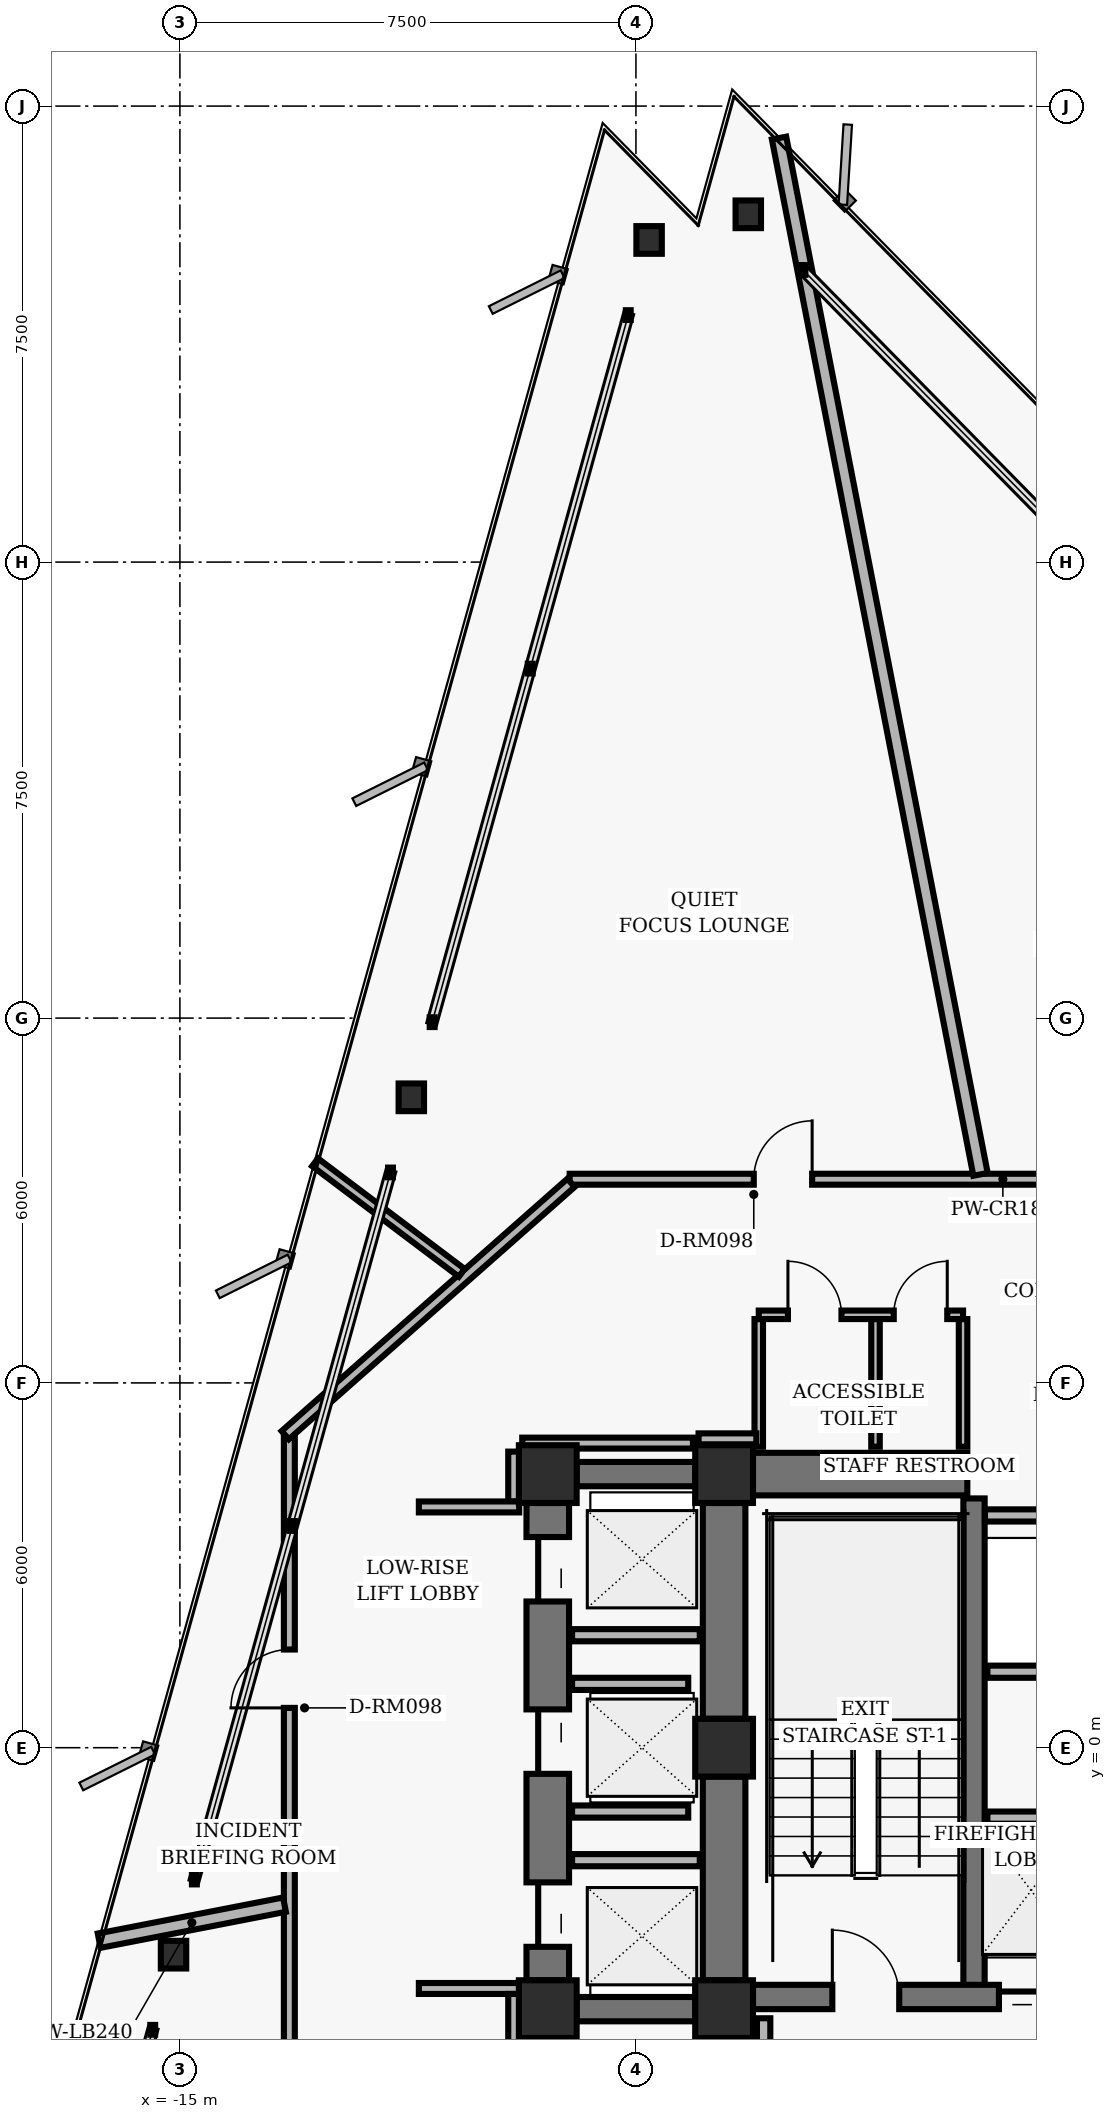
"""IFC4 building model, lengths in metres.
Left out: names, types, materials, properties, quantities, classifications, styles, units other than length and angle.
Written with IfcOpenShell. Run it as: python <this file> out.ifc"""

import sys

from ifc_helpers import new_model, si_unit, direction, frame, frame_2d, origin, origin_2d, place, context, subcontext, project, spatial, rectangle, hollow_rectangle, i_section, extrude, element, fill, save


model = new_model("IFC4")
c1 = context("Model", 3, precision=1e-05, world=origin(), true_north=direction((0.0, 1.0)))
c2 = subcontext(c1, "Body", "Model", "MODEL_VIEW")
j1 = project(units=[si_unit("LENGTHUNIT", "METRE"), si_unit("PLANEANGLEUNIT", "RADIAN")], contexts=[c1])
p1 = place(None, origin())
s1 = spatial("IfcSite", under=j1, at=p1, CompositionType="ELEMENT")
p2 = place(p1, origin())
s2 = spatial("IfcBuilding", under=s1, at=p2, CompositionType="ELEMENT")
p3 = place(p2, frame((0.0, 0.0, 79.52)))
s3 = spatial("IfcBuildingStorey", under=s2, at=p3, CompositionType="ELEMENT", Elevation=79.52)
for number, where, z_axis, x_axis in (
    (1, (-6.05, 4.5, 0.0), (0.0, 0.0, 1.0), (1.0, 0.0, 0.0)),
    (2, (-6.05, 0.0, 0.0), (0.0, 0.0, 1.0), (1.0, 0.0, 0.0)),
    (3, (-6.05, -4.3, 0.0), (0.0, 0.0, 1.0), (1.0, 0.0, 0.0)),
    (4, (-8.95, 4.5, 0.0), (0.0, 0.0, 1.0), (1.0, 0.0, 0.0)),
    (5, (-8.95, -4.3, 0.0), (0.0, 0.0, 1.0), (1.0, 0.0, 0.0)),
):
    element("IfcColumn", number, at=place(p3, frame(where, z_axis=z_axis, x_axis=x_axis)), inside=s3, PredefinedType="COLUMN", context=c2, shape_type="SweptSolid", body=[
        extrude(hollow_rectangle(XDim=0.95, YDim=0.95, WallThickness=0.06, InnerFilletRadius=0.02, OuterFilletRadius=0.04, at=origin_2d()), origin(), (0.0, 0.0, 1.0), 3.04),
    ])
p4 = place(p3, frame((-6.05, 0.475, 0.0), z_axis=(0.0, 0.0, 1.0), x_axis=(0.0, 1.0, 0.0)))
e6 = element("IfcWall", 6, at=p4, inside=s3, PredefinedType="SHEAR", context=c2, shape_type="SweptSolid", body=[
    extrude(rectangle(XDim=3.55, YDim=0.7, at=frame_2d((1.775, 0.0))), origin(), (0.0, 0.0, 1.0), 2.788),
])
p5 = place(p3, frame((-6.05, -3.825, 0.0), z_axis=(0.0, 0.0, 1.0), x_axis=(0.0, 1.0, 0.0)))
e7 = element("IfcWall", 7, at=p5, inside=s3, PredefinedType="SHEAR", context=c2, shape_type="SweptSolid", body=[
    extrude(rectangle(XDim=3.35, YDim=0.7, at=frame_2d((1.675, 0.0))), origin(), (0.0, 0.0, 1.0), 2.788),
])
p6 = place(p3, frame((-1.94, -4.1, 0.0), z_axis=(0.0, 0.0, 1.0), x_axis=(0.0, 1.0, 0.0)))
e8 = element("IfcWall", 8, at=p6, inside=s3, PredefinedType="SHEAR", context=c2, shape_type="SweptSolid", body=[
    extrude(rectangle(XDim=8.2, YDim=0.35, at=frame_2d((4.1, 0.0))), origin(), (0.0, 0.0, 1.0), 2.788),
])
p7 = place(p3, frame((-5.575, -4.1, 0.0), z_axis=(0.0, 0.0, 1.0), x_axis=(1.0, 0.0, 0.0)))
e9 = element("IfcWall", 9, at=p7, inside=s3, PredefinedType="SHEAR", context=c2, shape_type="SweptSolid", body=[
    extrude(rectangle(XDim=11.15, YDim=0.4, at=frame_2d((5.575, 0.0))), origin(), (0.0, 0.0, 1.0), 2.788),
])
p8 = place(p7, frame((1.305, 0.0, 0.0)))
e10 = element("IfcOpeningElement", 10, at=p8, cuts=e9, PredefinedType="OPENING", context=c2, shape_type="SweptSolid", body=[
    extrude(rectangle(XDim=1.1, YDim=2.04, at=frame_2d((0.55, 1.02))), frame((0.0, 0.21, 0.0), z_axis=(0.0, -1.0, 0.0), x_axis=(1.0, 0.0, 0.0)), (0.0, 0.0, 1.0), 0.42),
])
p9 = place(p7, frame((8.745, 0.0, 0.0)))
e11 = element("IfcOpeningElement", 11, at=p9, cuts=e9, PredefinedType="OPENING", context=c2, shape_type="SweptSolid", body=[
    extrude(rectangle(XDim=1.1, YDim=2.04, at=frame_2d((0.55, 1.02))), frame((0.0, 0.21, 0.0), z_axis=(0.0, -1.0, 0.0), x_axis=(1.0, 0.0, 0.0)), (0.0, 0.0, 1.0), 0.42),
])
p10 = place(p7, frame((4.045, 0.0, 0.0)))
e12 = element("IfcOpeningElement", 12, at=p10, cuts=e9, PredefinedType="OPENING", context=c2, shape_type="SweptSolid", body=[
    extrude(rectangle(XDim=1.06, YDim=2.04, at=frame_2d((0.53, 1.02))), frame((0.0, 0.21, 0.0), z_axis=(0.0, -1.0, 0.0), x_axis=(1.0, 0.0, 0.0)), (0.0, 0.0, 1.0), 0.42),
])
p11 = place(p7, frame((6.045, 0.0, 0.0)))
e13 = element("IfcOpeningElement", 13, at=p11, cuts=e9, PredefinedType="OPENING", context=c2, shape_type="SweptSolid", body=[
    extrude(rectangle(XDim=1.06, YDim=2.04, at=frame_2d((0.53, 1.02))), frame((0.0, 0.21, 0.0), z_axis=(0.0, -1.0, 0.0), x_axis=(1.0, 0.0, 0.0)), (0.0, 0.0, 1.0), 0.42),
])
p12 = place(p3, frame((-5.575, 4.5, 0.0), z_axis=(0.0, 0.0, 1.0), x_axis=(1.0, 0.0, 0.0)))
e14 = element("IfcWall", 14, at=p12, inside=s3, PredefinedType="SHEAR", context=c2, shape_type="SweptSolid", body=[
    extrude(rectangle(XDim=3.525, YDim=0.7, at=frame_2d((1.762, 0.0))), origin(), (0.0, 0.0, 1.0), 2.788),
])
p13 = place(p3, frame((-8.95, -3.825, 0.0), z_axis=(0.0, 0.0, 1.0), x_axis=(0.0, 1.0, 0.0)))
e15 = element("IfcWall", 15, at=p13, inside=s3, PredefinedType="SHEAR", context=c2, shape_type="SweptSolid", body=[
    extrude(rectangle(XDim=7.85, YDim=0.7, at=frame_2d((3.925, 0.0))), origin(), (0.0, 0.0, 1.0), 2.788),
])
p14 = place(p13, frame((0.55, 0.0, 0.0)))
e16 = element("IfcOpeningElement", 16, at=p14, cuts=e15, PredefinedType="OPENING", context=c2, shape_type="SweptSolid", body=[
    extrude(rectangle(XDim=1.06, YDim=2.04, at=frame_2d((0.53, 1.02))), frame((0.0, 0.36, 0.0), z_axis=(0.0, -1.0, 0.0), x_axis=(1.0, 0.0, 0.0)), (0.0, 0.0, 1.0), 0.72),
])
p15 = place(p13, frame((3.395, 0.0, 0.0)))
e17 = element("IfcOpeningElement", 17, at=p15, cuts=e15, PredefinedType="OPENING", context=c2, shape_type="SweptSolid", body=[
    extrude(rectangle(XDim=1.06, YDim=2.04, at=frame_2d((0.53, 1.02))), frame((0.0, 0.36, 0.0), z_axis=(0.0, -1.0, 0.0), x_axis=(1.0, 0.0, 0.0)), (0.0, 0.0, 1.0), 0.72),
])
p16 = place(p13, frame((6.23, 0.0, 0.0)))
e18 = element("IfcOpeningElement", 18, at=p16, cuts=e15, PredefinedType="OPENING", context=c2, shape_type="SweptSolid", body=[
    extrude(rectangle(XDim=1.06, YDim=2.04, at=frame_2d((0.53, 1.02))), frame((0.0, 0.36, 0.0), z_axis=(0.0, -1.0, 0.0), x_axis=(1.0, 0.0, 0.0)), (0.0, 0.0, 1.0), 0.72),
])
for number, where, z_axis, x_axis in (
    (19, (-8.475, 4.5, 0.0), (0.0, 0.0, 1.0), (1.0, 0.0, 0.0)),
    (20, (-8.475, -4.3, 0.0), (0.0, 0.0, 1.0), (1.0, 0.0, 0.0)),
):
    element("IfcWall", number, at=place(p3, frame(where, z_axis=z_axis, x_axis=x_axis)), inside=s3, PredefinedType="SHEAR", context=c2, shape_type="SweptSolid", body=[
        extrude(rectangle(XDim=1.95, YDim=0.4, at=frame_2d((0.975, 0.0))), origin(), (0.0, 0.0, 1.0), 2.788),
    ])
for number, where, z_axis, x_axis in (
    (21, (-5.652, 25.22, 0.0), (0.0, 0.0, 1.0), (1.0, 0.0, 0.0)),
    (22, (-7.283, 24.798, 0.0), (0.0, 0.0, 1.0), (1.0, 0.0, 0.0)),
    (23, (-11.194, 10.697, 0.0), (0.0, 0.0, 1.0), (1.0, 0.0, 0.0)),
    (24, (-15.104, -3.404, 0.0), (0.0, 0.0, 1.0), (1.0, 0.0, 0.0)),
):
    element("IfcColumn", number, at=place(p3, frame(where, z_axis=z_axis, x_axis=x_axis)), inside=s3, PredefinedType="COLUMN", context=c2, shape_type="SweptSolid", body=[
        extrude(i_section(OverallWidth=0.418, OverallDepth=0.455, WebThickness=0.042, FlangeThickness=0.068, FilletRadius=0.025, at=origin_2d()), origin(), (0.0, 0.0, 1.0), 3.04),
    ])
p17 = place(p3, frame((-1.72, -1.15, 0.0), z_axis=(0.0, 0.0, 1.0), x_axis=(1.0, 0.0, 0.0)))
e25 = element("IfcWall", 25, at=p17, inside=s3, PredefinedType="PARTITIONING", context=c2, shape_type="SweptSolid", body=[
    extrude(rectangle(XDim=3.44, YDim=0.2, at=frame_2d((1.72, 0.0))), origin(), (0.0, 0.0, 1.0), 2.763),
])
p18 = place(p3, frame((-5.4, -7.16, 0.0), z_axis=(0.0, 0.0, 1.0), x_axis=(0.0, 1.0, 0.0)))
e26 = element("IfcWall", 26, at=p18, inside=s3, PredefinedType="PARTITIONING", context=c2, shape_type="SweptSolid", body=[
    extrude(rectangle(XDim=2.71, YDim=0.22, at=frame_2d((1.355, 0.0))), origin(), (0.0, 0.0, 1.0), 2.763),
])
p19 = place(p3, frame((-1.72, 1.25, 0.0), z_axis=(0.0, 0.0, 1.0), x_axis=(1.0, 0.0, 0.0)))
e27 = element("IfcWall", 27, at=p19, inside=s3, PredefinedType="PARTITIONING", context=c2, shape_type="SweptSolid", body=[
    extrude(rectangle(XDim=3.44, YDim=0.2, at=frame_2d((1.72, 0.0))), origin(), (0.0, 0.0, 1.0), 2.763),
])
p20 = place(p3, frame((-1.76, 3.82, 0.0), z_axis=(0.0, 0.0, 1.0), x_axis=(1.0, 0.0, 0.0)))
e28 = element("IfcWall", 28, at=p20, inside=s3, PredefinedType="PARTITIONING", context=c2, shape_type="SweptSolid", body=[
    extrude(rectangle(XDim=3.52, YDim=0.2, at=frame_2d((1.76, 0.0))), origin(), (0.0, 0.0, 1.0), 2.763),
])
for number, where, z_axis, x_axis in (
    (29, (-5.48, 4.95, 0.0), (0.0, 0.0, 1.0), (0.0, 1.0, 0.0)),
    (30, (-3.56, 4.95, 0.0), (0.0, 0.0, 1.0), (0.0, 1.0, 0.0)),
    (31, (-2.12, 4.95, 0.0), (0.0, 0.0, 1.0), (0.0, 1.0, 0.0)),
):
    element("IfcWall", number, at=place(p3, frame(where, z_axis=z_axis, x_axis=x_axis)), inside=s3, PredefinedType="PARTITIONING", context=c2, shape_type="SweptSolid", body=[
        extrude(rectangle(XDim=2.1, YDim=0.14, at=frame_2d((1.05, 0.0))), origin(), (0.0, 0.0, 1.0), 2.763),
    ])
p21 = place(p3, frame((-5.48, 7.12, 0.0), z_axis=(0.0, 0.0, 1.0), x_axis=(1.0, 0.0, 0.0)))
e32 = element("IfcWall", 32, at=p21, inside=s3, PredefinedType="PARTITIONING", context=c2, shape_type="SweptSolid", body=[
    extrude(rectangle(XDim=3.36, YDim=0.14, at=frame_2d((1.68, 0.0))), origin(), (0.0, 0.0, 1.0), 2.763),
])
p22 = place(p21, frame((0.48, 0.0, 0.0)))
e33 = element("IfcOpeningElement", 33, at=p22, cuts=e32, PredefinedType="OPENING", context=c2, shape_type="SweptSolid", body=[
    extrude(rectangle(XDim=0.88, YDim=2.02, at=frame_2d((0.44, 1.01))), frame((0.0, 0.08, 0.0), z_axis=(0.0, -1.0, 0.0), x_axis=(1.0, 0.0, 0.0)), (0.0, 0.0, 1.0), 0.16),
])
p23 = place(p21, frame((2.22, 0.0, 0.0)))
e34 = element("IfcOpeningElement", 34, at=p23, cuts=e32, PredefinedType="OPENING", context=c2, shape_type="SweptSolid", body=[
    extrude(rectangle(XDim=0.88, YDim=2.02, at=frame_2d((0.44, 1.01))), frame((0.0, 0.08, 0.0), z_axis=(0.0, -1.0, 0.0), x_axis=(1.0, 0.0, 0.0)), (0.0, 0.0, 1.0), 0.16),
])
for number, where, z_axis, x_axis in (
    (35, (-8.55, -1.85, 0.0), (0.0, 0.0, 1.0), (1.0, 0.0, 0.0)),
    (36, (-8.55, 1.85, 0.0), (0.0, 0.0, 1.0), (1.0, 0.0, 0.0)),
):
    element("IfcWall", number, at=place(p3, frame(where, z_axis=z_axis, x_axis=x_axis)), inside=s3, PredefinedType="PARTITIONING", context=c2, shape_type="SweptSolid", body=[
        extrude(rectangle(XDim=2.1, YDim=0.2, at=frame_2d((1.05, 0.0))), origin(), (0.0, 0.0, 1.0), 2.763),
    ])
for number, where, z_axis, x_axis in (
    (37, (-8.55, -1.05, 0.0), (0.0, 0.0, 1.0), (1.0, 0.0, 0.0)),
    (38, (-8.55, 1.05, 0.0), (0.0, 0.0, 1.0), (1.0, 0.0, 0.0)),
):
    element("IfcWall", number, at=place(p3, frame(where, z_axis=z_axis, x_axis=x_axis)), inside=s3, PredefinedType="PARTITIONING", context=c2, shape_type="SweptSolid", body=[
        extrude(rectangle(XDim=1.91, YDim=0.2, at=frame_2d((0.955, 0.0))), origin(), (0.0, 0.0, 1.0), 2.763),
    ])
p24 = place(p3, frame((-8.59, 9.35, 0.0), z_axis=(0.0, 0.0, 1.0), x_axis=(1.0, 0.0, 0.0)))
e39 = element("IfcWall", 39, at=p24, inside=s3, PredefinedType="PARTITIONING", context=c2, shape_type="SweptSolid", body=[
    extrude(rectangle(XDim=17.18, YDim=0.18, at=frame_2d((8.59, 0.0))), origin(), (0.0, 0.0, 1.0), 2.277),
])
p25 = place(p24, frame((10.261, 0.0, 0.0)))
e40 = element("IfcOpeningElement", 40, at=p25, cuts=e39, PredefinedType="OPENING", context=c2, shape_type="SweptSolid", body=[
    extrude(rectangle(XDim=0.96, YDim=2.02, at=frame_2d((0.48, 1.01))), frame((0.0, 0.1, 0.0), z_axis=(0.0, -1.0, 0.0), x_axis=(1.0, 0.0, 0.0)), (0.0, 0.0, 1.0), 0.2),
])
p26 = place(p24, frame((3.028, 0.0, 0.0)))
e41 = element("IfcOpeningElement", 41, at=p26, cuts=e39, PredefinedType="OPENING", context=c2, shape_type="SweptSolid", body=[
    extrude(rectangle(XDim=0.96, YDim=2.02, at=frame_2d((0.48, 1.01))), frame((0.0, 0.1, 0.0), z_axis=(0.0, -1.0, 0.0), x_axis=(1.0, 0.0, 0.0)), (0.0, 0.0, 1.0), 0.2),
])
p27 = place(p3, frame((-13.2, -5.11, 0.0), z_axis=(0.0, 0.0, 1.0), x_axis=(0.0, 1.0, 0.0)))
e42 = element("IfcWall", 42, at=p27, inside=s3, PredefinedType="PARTITIONING", context=c2, shape_type="SweptSolid", body=[
    extrude(rectangle(XDim=10.22, YDim=0.18, at=frame_2d((5.11, 0.0))), origin(), (0.0, 0.0, 1.0), 2.143),
])
p28 = place(p27, frame((5.765, 0.0, 0.0)))
e43 = element("IfcOpeningElement", 43, at=p28, cuts=e42, PredefinedType="OPENING", context=c2, shape_type="SweptSolid", body=[
    extrude(rectangle(XDim=0.96, YDim=2.02, at=frame_2d((0.48, 1.01))), frame((0.0, 0.1, 0.0), z_axis=(0.0, -1.0, 0.0), x_axis=(1.0, 0.0, 0.0)), (0.0, 0.0, 1.0), 0.2),
])
p29 = place(p3, frame((-13.268, 5.14, 0.0), z_axis=(0.0, 0.0, 1.0), x_axis=(0.749626463267, 0.66186113768, 0.0)))
e44 = element("IfcWall", 44, at=p29, inside=s3, PredefinedType="PARTITIONING", context=c2, shape_type="SweptSolid", body=[
    extrude(rectangle(XDim=6.27, YDim=0.18, at=frame_2d((3.135, 0.0))), origin(), (0.0, 0.0, 1.0), 2.763),
])
p30 = place(p3, frame((-9.51, 4.87, 0.0), z_axis=(0.0, 0.0, 1.0), x_axis=(0.0, -1.0, 0.0)))
e45 = element("IfcWall", 45, at=p30, inside=s3, PredefinedType="PARTITIONING", context=c2, shape_type="SweptSolid", body=[
    extrude(rectangle(XDim=0.82, YDim=0.18, at=frame_2d((0.41, 0.0))), origin(), (0.0, 0.0, 1.0), 2.277),
])
p31 = place(p3, frame((-9.42, 3.96, 0.0), z_axis=(0.0, 0.0, 1.0), x_axis=(-1.0, 0.0, 0.0)))
e46 = element("IfcWall", 46, at=p31, inside=s3, PredefinedType="PARTITIONING", context=c2, shape_type="SweptSolid", body=[
    extrude(rectangle(XDim=1.65, YDim=0.18, at=frame_2d((0.825, 0.0))), origin(), (0.0, 0.0, 1.0), 2.763),
])
p32 = place(p3, frame((-11.07, -3.96, 0.0), z_axis=(0.0, 0.0, 1.0), x_axis=(1.0, 0.0, 0.0)))
e47 = element("IfcWall", 47, at=p32, inside=s3, PredefinedType="PARTITIONING", context=c2, shape_type="SweptSolid", body=[
    extrude(rectangle(XDim=1.65, YDim=0.18, at=frame_2d((0.825, 0.0))), origin(), (0.0, 0.0, 1.0), 2.048),
])
p33 = place(p3, frame((-9.51, -4.05, 0.0), z_axis=(0.0, 0.0, 1.0), x_axis=(0.0, -1.0, 0.0)))
e48 = element("IfcWall", 48, at=p33, inside=s3, PredefinedType="PARTITIONING", context=c2, shape_type="SweptSolid", body=[
    extrude(rectangle(XDim=0.82, YDim=0.18, at=frame_2d((0.41, 0.0))), origin(), (0.0, 0.0, 1.0), 2.763),
])
p34 = place(p3, frame((-5.52, 5.08, 0.0), z_axis=(0.0, 0.0, 1.0), x_axis=(-1.0, 0.0, 0.0)))
e49 = element("IfcWall", 49, at=p34, inside=s3, PredefinedType="PARTITIONING", context=c2, shape_type="SweptSolid", body=[
    extrude(rectangle(XDim=0.95, YDim=0.18, at=frame_2d((0.475, 0.0))), origin(), (0.0, 0.0, 1.0), 2.763),
])
p35 = place(p3, frame((-6.562, 5.01, 0.0), z_axis=(0.0, 0.0, 1.0), x_axis=(-1.0, 0.0, 0.0)))
e50 = element("IfcWall", 50, at=p35, inside=s3, PredefinedType="PARTITIONING", context=c2, shape_type="SweptSolid", body=[
    extrude(rectangle(XDim=2.808, YDim=0.18, at=frame_2d((1.404, 0.0))), origin(), (0.0, 0.0, 1.0), 2.763),
])
p36 = place(p3, frame((-13.28, -2.581, 0.0), z_axis=(0.0, 0.0, 1.0), x_axis=(-0.98161907283, -0.190850716155, 0.0)))
e51 = element("IfcWall", 51, at=p36, inside=s3, PredefinedType="PARTITIONING", context=c2, shape_type="SweptSolid", body=[
    extrude(rectangle(XDim=3.105, YDim=0.24, at=frame_2d((1.552, 0.0))), origin(), (0.0, 0.0, 1.0), 2.763),
])
p37 = place(p3, frame((-1.833, 9.43, 0.0), z_axis=(0.0, 0.0, 1.0), x_axis=(-0.190802669454, 0.981628413061, 0.0)))
e52 = element("IfcWall", 52, at=p37, inside=s3, PredefinedType="PARTITIONING", context=c2, shape_type="SweptSolid", body=[
    extrude(rectangle(XDim=17.364, YDim=0.24, at=frame_2d((8.682, 0.0))), origin(), (0.0, 0.0, 1.0), 2.763),
])
p38 = place(p3, frame((-10.365, 7.81, 0.0), z_axis=(0.0, 0.0, 1.0), x_axis=(-0.79865006228, 0.601795711201, 0.0)))
e53 = element("IfcWall", 53, at=p38, inside=s3, PredefinedType="PARTITIONING", context=c2, shape_type="SweptSolid", body=[
    extrude(rectangle(XDim=3.021, YDim=0.16, at=frame_2d((1.511, 0.0))), origin(), (0.0, 0.0, 1.0), 2.763),
])
p39 = place(p8, origin())
e54 = element("IfcDoor", 54, at=p39, inside=s3, OperationType="SINGLE_SWING_LEFT", PredefinedType="DOOR", context=c2, shape_type="SweptSolid", body=[
    extrude(rectangle(XDim=1.1, YDim=2.04, at=frame_2d((0.55, 1.02))), frame((0.0, 0.025, 0.0), z_axis=(0.0, -1.0, 0.0), x_axis=(1.0, 0.0, 0.0)), (0.0, 0.0, 1.0), 0.05),
])
fill(e10, e54)
p40 = place(p10, origin())
e55 = element("IfcDoor", 55, at=p40, inside=s3, OperationType="SLIDING_TO_LEFT", PredefinedType="DOOR", context=c2, shape_type="SweptSolid", body=[
    extrude(rectangle(XDim=1.06, YDim=2.04, at=frame_2d((0.53, 1.02))), frame((0.0, 0.025, 0.0), z_axis=(0.0, -1.0, 0.0), x_axis=(1.0, 0.0, 0.0)), (0.0, 0.0, 1.0), 0.05),
])
fill(e12, e55)
p41 = place(p22, origin())
e56 = element("IfcDoor", 56, at=p41, inside=s3, OperationType="SINGLE_SWING_LEFT", PredefinedType="DOOR", context=c2, shape_type="SweptSolid", body=[
    extrude(rectangle(XDim=0.88, YDim=2.02, at=frame_2d((0.44, 1.01))), frame((0.0, 0.025, 0.0), z_axis=(0.0, -1.0, 0.0), x_axis=(1.0, 0.0, 0.0)), (0.0, 0.0, 1.0), 0.05),
])
fill(e33, e56)
p42 = place(p23, origin())
e57 = element("IfcDoor", 57, at=p42, inside=s3, OperationType="SINGLE_SWING_RIGHT", PredefinedType="DOOR", context=c2, shape_type="SweptSolid", body=[
    extrude(rectangle(XDim=0.88, YDim=2.02, at=frame_2d((0.44, 1.01))), frame((0.0, 0.025, 0.0), z_axis=(0.0, -1.0, 0.0), x_axis=(1.0, 0.0, 0.0)), (0.0, 0.0, 1.0), 0.05),
])
fill(e34, e57)
p43 = place(p14, origin())
e58 = element("IfcDoor", 58, at=p43, inside=s3, OperationType="SLIDING_TO_LEFT", PredefinedType="DOOR", context=c2, shape_type="SweptSolid", body=[
    extrude(rectangle(XDim=1.06, YDim=2.04, at=frame_2d((0.53, 1.02))), frame((0.0, 0.025, 0.0), z_axis=(0.0, -1.0, 0.0), x_axis=(1.0, 0.0, 0.0)), (0.0, 0.0, 1.0), 0.05),
])
fill(e16, e58)
p44 = place(p15, origin())
e59 = element("IfcDoor", 59, at=p44, inside=s3, OperationType="SLIDING_TO_RIGHT", PredefinedType="DOOR", context=c2, shape_type="SweptSolid", body=[
    extrude(rectangle(XDim=1.06, YDim=2.04, at=frame_2d((0.53, 1.02))), frame((0.0, 0.025, 0.0), z_axis=(0.0, -1.0, 0.0), x_axis=(1.0, 0.0, 0.0)), (0.0, 0.0, 1.0), 0.05),
])
fill(e17, e59)
p45 = place(p16, origin())
e60 = element("IfcDoor", 60, at=p45, inside=s3, OperationType="SLIDING_TO_LEFT", PredefinedType="DOOR", context=c2, shape_type="SweptSolid", body=[
    extrude(rectangle(XDim=1.06, YDim=2.04, at=frame_2d((0.53, 1.02))), frame((0.0, 0.025, 0.0), z_axis=(0.0, -1.0, 0.0), x_axis=(1.0, 0.0, 0.0)), (0.0, 0.0, 1.0), 0.05),
])
fill(e18, e60)
p46 = place(p26, origin())
e61 = element("IfcDoor", 61, at=p46, inside=s3, OperationType="SINGLE_SWING_RIGHT", PredefinedType="DOOR", context=c2, shape_type="SweptSolid", body=[
    extrude(rectangle(XDim=0.96, YDim=2.02, at=frame_2d((0.48, 1.01))), frame((0.0, 0.025, 0.0), z_axis=(0.0, -1.0, 0.0), x_axis=(1.0, 0.0, 0.0)), (0.0, 0.0, 1.0), 0.05),
])
fill(e41, e61)
p47 = place(p28, origin())
e62 = element("IfcDoor", 62, at=p47, inside=s3, OperationType="SINGLE_SWING_LEFT", PredefinedType="DOOR", context=c2, shape_type="SweptSolid", body=[
    extrude(rectangle(XDim=0.96, YDim=2.02, at=frame_2d((0.48, 1.01))), frame((0.0, 0.025, 0.0), z_axis=(0.0, -1.0, 0.0), x_axis=(1.0, 0.0, 0.0)), (0.0, 0.0, 1.0), 0.05),
])
fill(e43, e62)
save(model, sys.argv[1])
